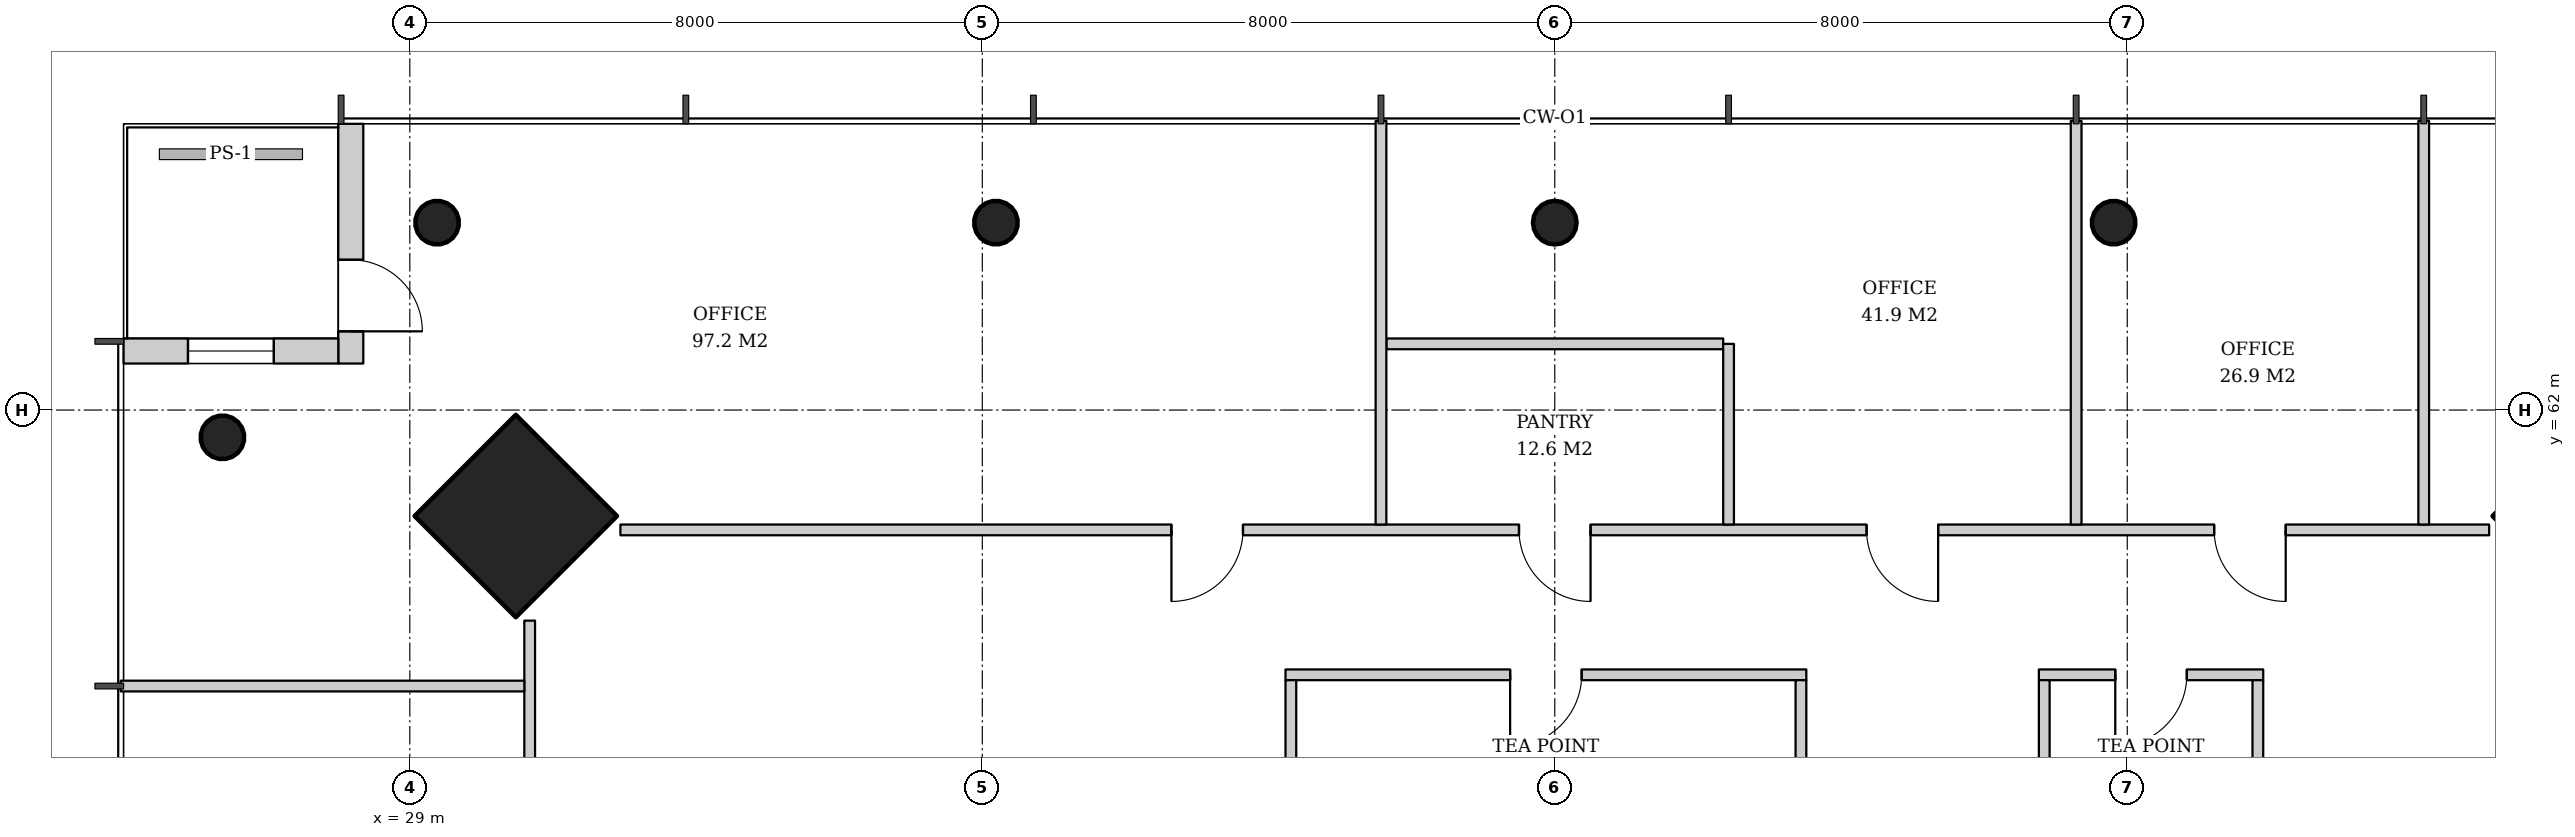
"""IFC4 building model, lengths in metres.
Left out: names, types, materials, properties, quantities, classifications, styles, units other than length and angle.
Written with IfcOpenShell. Run it as: python <this file> out.ifc"""

import sys

from ifc_helpers import new_model, si_unit, direction, frame, frame_2d, origin, origin_2d, place, context, subcontext, project, spatial, rectangle, hollow_circle, extrude, element, fill, save


model = new_model("IFC4")
c1 = context("Model", 3, precision=1e-05, world=origin(), true_north=direction((0.0, 1.0)))
c2 = subcontext(c1, "Body", "Model", "MODEL_VIEW")
j1 = project(units=[si_unit("LENGTHUNIT", "METRE"), si_unit("PLANEANGLEUNIT", "RADIAN")], contexts=[c1])
p1 = place(None, origin())
s1 = spatial("IfcSite", under=j1, at=p1, CompositionType="ELEMENT")
p2 = place(p1, origin())
s2 = spatial("IfcBuilding", under=s1, at=p2, CompositionType="ELEMENT")
p3 = place(p2, frame((0.0, 0.0, 188.2)))
s3 = spatial("IfcBuildingStorey", under=s2, at=p3, CompositionType="ELEMENT", Elevation=188.2)
for number, where, z_axis, x_axis in (
    (1, (59.557, 60.557, 0.0), (-0.032, -0.032, 0.999), (0.707, -0.707, 0.0)),
    (2, (30.443, 60.557, 0.0), (0.032, -0.032, 0.999), (0.707, 0.707, 0.0)),
):
    element("IfcColumn", number, at=place(p3, frame(where, z_axis=z_axis, x_axis=x_axis)), inside=s3, PredefinedType="COLUMN", context=c2, shape_type="SweptSolid", body=[
        extrude(rectangle(XDim=2.0, YDim=2.0, at=origin_2d()), origin(), (0.0, 0.0, 1.0), 3.804),
    ])
p4 = place(p3, frame((29.343, 64.657, 0.0), z_axis=(0.031962158256, -0.031962158256, 0.998977898093), x_axis=(0.707106781187, 0.707106781187, 0.0)))
e3 = element("IfcColumn", 3, at=p4, inside=s3, PredefinedType="COLUMN", context=c2, shape_type="SweptSolid", body=[
    extrude(hollow_circle(Radius=0.305, WallThickness=0.025, at=origin_2d()), origin(), (0.0, 0.0, 1.0), 3.804),
])
p5 = place(p3, frame((52.829, 64.657, 0.0), z_axis=(-0.015987204877, -0.031974409754, 0.999360818924), x_axis=(0.894427191, -0.4472135955, 0.0)))
e4 = element("IfcColumn", 4, at=p5, inside=s3, PredefinedType="COLUMN", context=c2, shape_type="SweptSolid", body=[
    extrude(hollow_circle(Radius=0.305, WallThickness=0.025, at=origin_2d()), origin(), (0.0, 0.0, 1.0), 3.802),
])
p6 = place(p3, frame((45.0, 64.657, 0.0), z_axis=(0.0, -0.031978496719, 0.999488557087), x_axis=(1.0, 0.0, 0.0)))
e5 = element("IfcColumn", 5, at=p6, inside=s3, PredefinedType="COLUMN", context=c2, shape_type="SweptSolid", body=[
    extrude(hollow_circle(Radius=0.305, WallThickness=0.025, at=origin_2d()), origin(), (0.0, 0.0, 1.0), 3.802),
])
p7 = place(p3, frame((37.171, 64.657, 0.0), z_axis=(0.015987204877, -0.031974409754, 0.999360818924), x_axis=(0.894427191, 0.4472135955, 0.0)))
e6 = element("IfcColumn", 6, at=p7, inside=s3, PredefinedType="COLUMN", context=c2, shape_type="SweptSolid", body=[
    extrude(hollow_circle(Radius=0.305, WallThickness=0.025, at=origin_2d()), origin(), (0.0, 0.0, 1.0), 3.802),
])
p8 = place(p3, frame((26.343, 61.657, 0.0), z_axis=(0.031962158256, -0.031962158256, 0.998977898093), x_axis=(0.707106781187, 0.707106781187, 0.0)))
e7 = element("IfcColumn", 7, at=p8, inside=s3, PredefinedType="COLUMN", context=c2, shape_type="SweptSolid", body=[
    extrude(hollow_circle(Radius=0.305, WallThickness=0.025, at=origin_2d()), origin(), (0.0, 0.0, 1.0), 3.804),
])
p9 = place(p3, frame((28.175, 66.0, 0.0), z_axis=(0.0, 0.0, 1.0), x_axis=(0.0, -1.0, 0.0)))
e8 = element("IfcWall", 8, at=p9, inside=s3, PredefinedType="SOLIDWALL", context=c2, shape_type="SweptSolid", body=[
    extrude(rectangle(XDim=3.35, YDim=0.35, at=frame_2d((1.675, 0.0))), origin(), (0.0, 0.0, 1.0), 3.62),
])
p10 = place(p9, frame((1.9, 0.0, 0.0)))
e9 = element("IfcOpeningElement", 9, at=p10, cuts=e8, PredefinedType="OPENING", context=c2, shape_type="SweptSolid", body=[
    extrude(rectangle(XDim=1.0, YDim=2.4, at=frame_2d((0.5, 1.2))), frame((0.0, 0.185, 0.0), z_axis=(0.0, -1.0, 0.0), x_axis=(1.0, 0.0, 0.0)), (0.0, 0.0, 1.0), 0.37),
])
p11 = place(p3, frame((28.0, 62.825, 0.0), z_axis=(0.0, 0.0, 1.0), x_axis=(-1.0, 0.0, 0.0)))
e10 = element("IfcWall", 10, at=p11, inside=s3, PredefinedType="SOLIDWALL", context=c2, shape_type="SweptSolid", body=[
    extrude(rectangle(XDim=3.0, YDim=0.35, at=frame_2d((1.5, 0.0))), origin(), (0.0, 0.0, 1.0), 3.62),
])
p12 = place(p11, frame((0.9, 0.0, 0.6)))
e11 = element("IfcOpeningElement", 11, at=p12, cuts=e10, PredefinedType="OPENING", context=c2, shape_type="SweptSolid", body=[
    extrude(rectangle(XDim=1.2, YDim=2.55, at=frame_2d((0.6, 1.275))), frame((0.0, 0.185, 0.0), z_axis=(0.0, -1.0, 0.0), x_axis=(1.0, 0.0, 0.0)), (0.0, 0.0, 1.0), 0.37),
])
p13 = place(p3, frame((54.9, 58.3, 0.0), z_axis=(0.0, 0.0, 1.0), x_axis=(-1.0, 0.0, 0.0)))
e12 = element("IfcWall", 12, at=p13, inside=s3, PredefinedType="PARTITIONING", context=c2, shape_type="SweptSolid", body=[
    extrude(rectangle(XDim=3.135, YDim=0.15, at=frame_2d((1.567, 0.0))), origin(), (0.0, 0.0, 1.0), 2.92),
])
p14 = place(p13, frame((1.067, 0.0, 0.0)))
e13 = element("IfcOpeningElement", 13, at=p14, cuts=e12, PredefinedType="OPENING", context=c2, shape_type="SweptSolid", body=[
    extrude(rectangle(XDim=1.0, YDim=2.1, at=frame_2d((0.5, 1.05))), frame((0.0, 0.085, 0.0), z_axis=(0.0, -1.0, 0.0), x_axis=(1.0, 0.0, 0.0)), (0.0, 0.0, 1.0), 0.17),
])
p15 = place(p3, frame((54.825, 55.9, 0.0), z_axis=(0.0, 0.0, 1.0), x_axis=(0.0, 1.0, 0.0)))
e14 = element("IfcWall", 14, at=p15, inside=s3, PredefinedType="PARTITIONING", context=c2, shape_type="SweptSolid", body=[
    extrude(rectangle(XDim=2.325, YDim=0.15, at=frame_2d((1.163, 0.0))), origin(), (0.0, 0.0, 1.0), 2.867),
])
p16 = place(p3, frame((51.84, 55.9, 0.0), z_axis=(0.0, 0.0, 1.0), x_axis=(0.0, 1.0, 0.0)))
e15 = element("IfcWall", 15, at=p16, inside=s3, PredefinedType="PARTITIONING", context=c2, shape_type="SweptSolid", body=[
    extrude(rectangle(XDim=2.325, YDim=0.15, at=frame_2d((1.163, 0.0))), origin(), (0.0, 0.0, 1.0), 3.62),
])
p17 = place(p3, frame((48.515, 58.3, 0.0), z_axis=(0.0, 0.0, 1.0), x_axis=(-1.0, 0.0, 0.0)))
e16 = element("IfcWall", 16, at=p17, inside=s3, PredefinedType="PARTITIONING", context=c2, shape_type="SweptSolid", body=[
    extrude(rectangle(XDim=7.278, YDim=0.15, at=frame_2d((3.639, 0.0))), origin(), (0.0, 0.0, 1.0), 2.867),
])
p18 = place(p17, frame((3.139, 0.0, 0.0)))
e17 = element("IfcOpeningElement", 17, at=p18, cuts=e16, PredefinedType="OPENING", context=c2, shape_type="SweptSolid", body=[
    extrude(rectangle(XDim=1.0, YDim=2.1, at=frame_2d((0.5, 1.05))), frame((0.0, 0.085, 0.0), z_axis=(0.0, -1.0, 0.0), x_axis=(1.0, 0.0, 0.0)), (0.0, 0.0, 1.0), 0.17),
])
for number, where, z_axis, x_axis in (
    (18, (48.44, 55.9, 0.0), (0.0, 0.0, 1.0), (0.0, 1.0, 0.0)),
    (19, (41.312, 55.9, 0.0), (0.0, 0.0, 1.0), (0.0, 1.0, 0.0)),
):
    element("IfcWall", number, at=place(p3, frame(where, z_axis=z_axis, x_axis=x_axis)), inside=s3, PredefinedType="PARTITIONING", context=c2, shape_type="SweptSolid", body=[
        extrude(rectangle(XDim=2.325, YDim=0.15, at=frame_2d((1.163, 0.0))), origin(), (0.0, 0.0, 1.0), 3.62),
    ])
p19 = place(p3, frame((47.354, 62.925, 0.0), z_axis=(0.0, 0.0, 1.0), x_axis=(-1.0, 0.0, 0.0)))
e20 = element("IfcWall", 20, at=p19, inside=s3, PredefinedType="PARTITIONING", context=c2, shape_type="SweptSolid", body=[
    extrude(rectangle(XDim=4.707, YDim=0.15, at=frame_2d((2.354, 0.0))), origin(), (0.0, 0.0, 1.0), 2.867),
])
p20 = place(p3, frame((58.057, 60.325, 0.0), z_axis=(0.0, 0.0, 1.0), x_axis=(-1.0, 0.0, 0.0)))
e21 = element("IfcWall", 21, at=p20, inside=s3, PredefinedType="PARTITIONING", context=c2, shape_type="SweptSolid", body=[
    extrude(rectangle(XDim=26.114, YDim=0.15, at=frame_2d((13.057, 0.0))), origin(), (0.0, 0.0, 1.0), 2.867),
])
p21 = place(p20, frame((2.843, 0.0, 0.0)))
e22 = element("IfcOpeningElement", 22, at=p21, cuts=e21, PredefinedType="OPENING", context=c2, shape_type="SweptSolid", body=[
    extrude(rectangle(XDim=1.0, YDim=2.1, at=frame_2d((0.5, 1.05))), frame((0.0, 0.085, 0.0), z_axis=(0.0, -1.0, 0.0), x_axis=(1.0, 0.0, 0.0)), (0.0, 0.0, 1.0), 0.17),
])
p22 = place(p20, frame((7.7, 0.0, 0.0)))
e23 = element("IfcOpeningElement", 23, at=p22, cuts=e21, PredefinedType="OPENING", context=c2, shape_type="SweptSolid", body=[
    extrude(rectangle(XDim=1.0, YDim=2.1, at=frame_2d((0.5, 1.05))), frame((0.0, 0.085, 0.0), z_axis=(0.0, -1.0, 0.0), x_axis=(1.0, 0.0, 0.0)), (0.0, 0.0, 1.0), 0.17),
])
p23 = place(p20, frame((12.557, 0.0, 0.0)))
e24 = element("IfcOpeningElement", 24, at=p23, cuts=e21, PredefinedType="OPENING", context=c2, shape_type="SweptSolid", body=[
    extrude(rectangle(XDim=1.0, YDim=2.1, at=frame_2d((0.5, 1.05))), frame((0.0, 0.085, 0.0), z_axis=(0.0, -1.0, 0.0), x_axis=(1.0, 0.0, 0.0)), (0.0, 0.0, 1.0), 0.17),
])
p24 = place(p20, frame((17.414, 0.0, 0.0)))
e25 = element("IfcOpeningElement", 25, at=p24, cuts=e21, PredefinedType="OPENING", context=c2, shape_type="SweptSolid", body=[
    extrude(rectangle(XDim=1.0, YDim=2.1, at=frame_2d((0.5, 1.05))), frame((0.0, 0.085, 0.0), z_axis=(0.0, -1.0, 0.0), x_axis=(1.0, 0.0, 0.0)), (0.0, 0.0, 1.0), 0.17),
])
for number, where, z_axis, x_axis in (
    (26, (57.143, 60.4, 0.0), (0.0, 0.0, 1.0), (0.0, 1.0, 0.0)),
    (27, (52.286, 60.4, 0.0), (0.0, 0.0, 1.0), (0.0, 1.0, 0.0)),
):
    element("IfcWall", number, at=place(p3, frame(where, z_axis=z_axis, x_axis=x_axis)), inside=s3, PredefinedType="PARTITIONING", context=c2, shape_type="SweptSolid", body=[
        extrude(rectangle(XDim=5.64, YDim=0.15, at=frame_2d((2.82, 0.0))), origin(), (0.0, 0.0, 1.0), 3.12),
    ])
p25 = place(p3, frame((47.428, 60.4, 0.0), z_axis=(0.0, 0.0, 1.0), x_axis=(0.0, 1.0, 0.0)))
e28 = element("IfcWall", 28, at=p25, inside=s3, PredefinedType="PARTITIONING", context=c2, shape_type="SweptSolid", body=[
    extrude(rectangle(XDim=2.525, YDim=0.15, at=frame_2d((1.263, 0.0))), origin(), (0.0, 0.0, 1.0), 3.62),
])
p26 = place(p3, frame((42.572, 60.4, 0.0), z_axis=(0.0, 0.0, 1.0), x_axis=(0.0, 1.0, 0.0)))
e29 = element("IfcWall", 29, at=p26, inside=s3, PredefinedType="PARTITIONING", context=c2, shape_type="SweptSolid", body=[
    extrude(rectangle(XDim=5.64, YDim=0.15, at=frame_2d((2.82, 0.0))), origin(), (0.0, 0.0, 1.0), 2.867),
])
p27 = place(p3, frame((30.675, 59.057, 0.0), z_axis=(0.0, 0.0, 1.0), x_axis=(0.0, -1.0, 0.0)))
e30 = element("IfcWall", 30, at=p27, inside=s3, PredefinedType="PARTITIONING", context=c2, shape_type="SweptSolid", body=[
    extrude(rectangle(XDim=26.114, YDim=0.15, at=frame_2d((13.057, 0.0))), origin(), (0.0, 0.0, 1.0), 2.867),
])
p28 = place(p27, frame((2.843, 0.0, 0.0)))
e31 = element("IfcOpeningElement", 31, at=p28, cuts=e30, PredefinedType="OPENING", context=c2, shape_type="SweptSolid", body=[
    extrude(rectangle(XDim=1.0, YDim=2.1, at=frame_2d((0.5, 1.05))), frame((0.0, 0.085, 0.0), z_axis=(0.0, -1.0, 0.0), x_axis=(1.0, 0.0, 0.0)), (0.0, 0.0, 1.0), 0.17),
])
p29 = place(p27, frame((7.3, 0.0, 0.0)))
e32 = element("IfcOpeningElement", 32, at=p29, cuts=e30, PredefinedType="OPENING", context=c2, shape_type="SweptSolid", body=[
    extrude(rectangle(XDim=1.8, YDim=2.4, at=frame_2d((0.9, 1.2))), frame((0.0, 0.085, 0.0), z_axis=(0.0, -1.0, 0.0), x_axis=(1.0, 0.0, 0.0)), (0.0, 0.0, 1.0), 0.17),
])
p30 = place(p27, frame((12.657, 0.0, 0.0)))
e33 = element("IfcOpeningElement", 33, at=p30, cuts=e30, PredefinedType="OPENING", context=c2, shape_type="SweptSolid", body=[
    extrude(rectangle(XDim=0.8, YDim=2.1, at=frame_2d((0.4, 1.05))), frame((0.0, 0.085, 0.0), z_axis=(0.0, -1.0, 0.0), x_axis=(1.0, 0.0, 0.0)), (0.0, 0.0, 1.0), 0.17),
])
p31 = place(p27, frame((17.414, 0.0, 0.0)))
e34 = element("IfcOpeningElement", 34, at=p31, cuts=e30, PredefinedType="OPENING", context=c2, shape_type="SweptSolid", body=[
    extrude(rectangle(XDim=1.0, YDim=2.1, at=frame_2d((0.5, 1.05))), frame((0.0, 0.085, 0.0), z_axis=(0.0, -1.0, 0.0), x_axis=(1.0, 0.0, 0.0)), (0.0, 0.0, 1.0), 0.17),
])
p32 = place(p27, frame((22.372, 0.0, 0.0)))
e35 = element("IfcOpeningElement", 35, at=p32, cuts=e30, PredefinedType="OPENING", context=c2, shape_type="SweptSolid", body=[
    extrude(rectangle(XDim=0.8, YDim=2.1, at=frame_2d((0.4, 1.05))), frame((0.0, 0.085, 0.0), z_axis=(0.0, -1.0, 0.0), x_axis=(1.0, 0.0, 0.0)), (0.0, 0.0, 1.0), 0.17),
])
p33 = place(p3, frame((30.6, 58.143, 0.0), z_axis=(0.0, 0.0, 1.0), x_axis=(-1.0, 0.0, 0.0)))
e36 = element("IfcWall", 36, at=p33, inside=s3, PredefinedType="PARTITIONING", context=c2, shape_type="SweptSolid", body=[
    extrude(rectangle(XDim=5.64, YDim=0.15, at=frame_2d((2.82, 0.0))), origin(), (0.0, 0.0, 1.0), 3.12),
])
p34 = place(p10, origin())
e37 = element("IfcDoor", 37, at=p34, inside=s3, OperationType="SINGLE_SWING_RIGHT", PredefinedType="DOOR", context=c2, shape_type="SweptSolid", body=[
    extrude(rectangle(XDim=1.0, YDim=2.4, at=frame_2d((0.5, 1.2))), frame((0.0, 0.025, 0.0), z_axis=(0.0, -1.0, 0.0), x_axis=(1.0, 0.0, 0.0)), (0.0, 0.0, 1.0), 0.05),
])
fill(e9, e37)
p35 = place(p12, origin())
e38 = element("IfcWindow", 38, at=p35, inside=s3, PartitioningType="SINGLE_PANEL", PredefinedType="WINDOW", context=c2, shape_type="SweptSolid", body=[
    extrude(rectangle(XDim=1.2, YDim=2.55, at=frame_2d((0.6, 1.275))), frame((0.0, 0.03, 0.0), z_axis=(0.0, -1.0, 0.0), x_axis=(1.0, 0.0, 0.0)), (0.0, 0.0, 1.0), 0.06),
])
fill(e11, e38)
p36 = place(p14, origin())
e39 = element("IfcDoor", 39, at=p36, inside=s3, OperationType="SINGLE_SWING_RIGHT", PredefinedType="DOOR", context=c2, shape_type="SweptSolid", body=[
    extrude(rectangle(XDim=1.0, YDim=2.1, at=frame_2d((0.5, 1.05))), frame((0.0, 0.025, 0.0), z_axis=(0.0, -1.0, 0.0), x_axis=(1.0, 0.0, 0.0)), (0.0, 0.0, 1.0), 0.05),
])
fill(e13, e39)
p37 = place(p18, origin())
e40 = element("IfcDoor", 40, at=p37, inside=s3, OperationType="SINGLE_SWING_RIGHT", PredefinedType="DOOR", context=c2, shape_type="SweptSolid", body=[
    extrude(rectangle(XDim=1.0, YDim=2.1, at=frame_2d((0.5, 1.05))), frame((0.0, 0.025, 0.0), z_axis=(0.0, -1.0, 0.0), x_axis=(1.0, 0.0, 0.0)), (0.0, 0.0, 1.0), 0.05),
])
fill(e17, e40)
p38 = place(p21, origin())
e41 = element("IfcDoor", 41, at=p38, inside=s3, OperationType="SINGLE_SWING_LEFT", PredefinedType="DOOR", context=c2, shape_type="SweptSolid", body=[
    extrude(rectangle(XDim=1.0, YDim=2.1, at=frame_2d((0.5, 1.05))), frame((0.0, 0.025, 0.0), z_axis=(0.0, -1.0, 0.0), x_axis=(1.0, 0.0, 0.0)), (0.0, 0.0, 1.0), 0.05),
])
fill(e22, e41)
p39 = place(p22, origin())
e42 = element("IfcDoor", 42, at=p39, inside=s3, OperationType="SINGLE_SWING_LEFT", PredefinedType="DOOR", context=c2, shape_type="SweptSolid", body=[
    extrude(rectangle(XDim=1.0, YDim=2.1, at=frame_2d((0.5, 1.05))), frame((0.0, 0.025, 0.0), z_axis=(0.0, -1.0, 0.0), x_axis=(1.0, 0.0, 0.0)), (0.0, 0.0, 1.0), 0.05),
])
fill(e23, e42)
p40 = place(p23, origin())
e43 = element("IfcDoor", 43, at=p40, inside=s3, OperationType="SINGLE_SWING_LEFT", PredefinedType="DOOR", context=c2, shape_type="SweptSolid", body=[
    extrude(rectangle(XDim=1.0, YDim=2.1, at=frame_2d((0.5, 1.05))), frame((0.0, 0.025, 0.0), z_axis=(0.0, -1.0, 0.0), x_axis=(1.0, 0.0, 0.0)), (0.0, 0.0, 1.0), 0.05),
])
fill(e24, e43)
p41 = place(p24, origin())
e44 = element("IfcDoor", 44, at=p41, inside=s3, OperationType="SINGLE_SWING_RIGHT", PredefinedType="DOOR", context=c2, shape_type="SweptSolid", body=[
    extrude(rectangle(XDim=1.0, YDim=2.1, at=frame_2d((0.5, 1.05))), frame((0.0, 0.025, 0.0), z_axis=(0.0, -1.0, 0.0), x_axis=(1.0, 0.0, 0.0)), (0.0, 0.0, 1.0), 0.05),
])
fill(e25, e44)
save(model, sys.argv[1])
